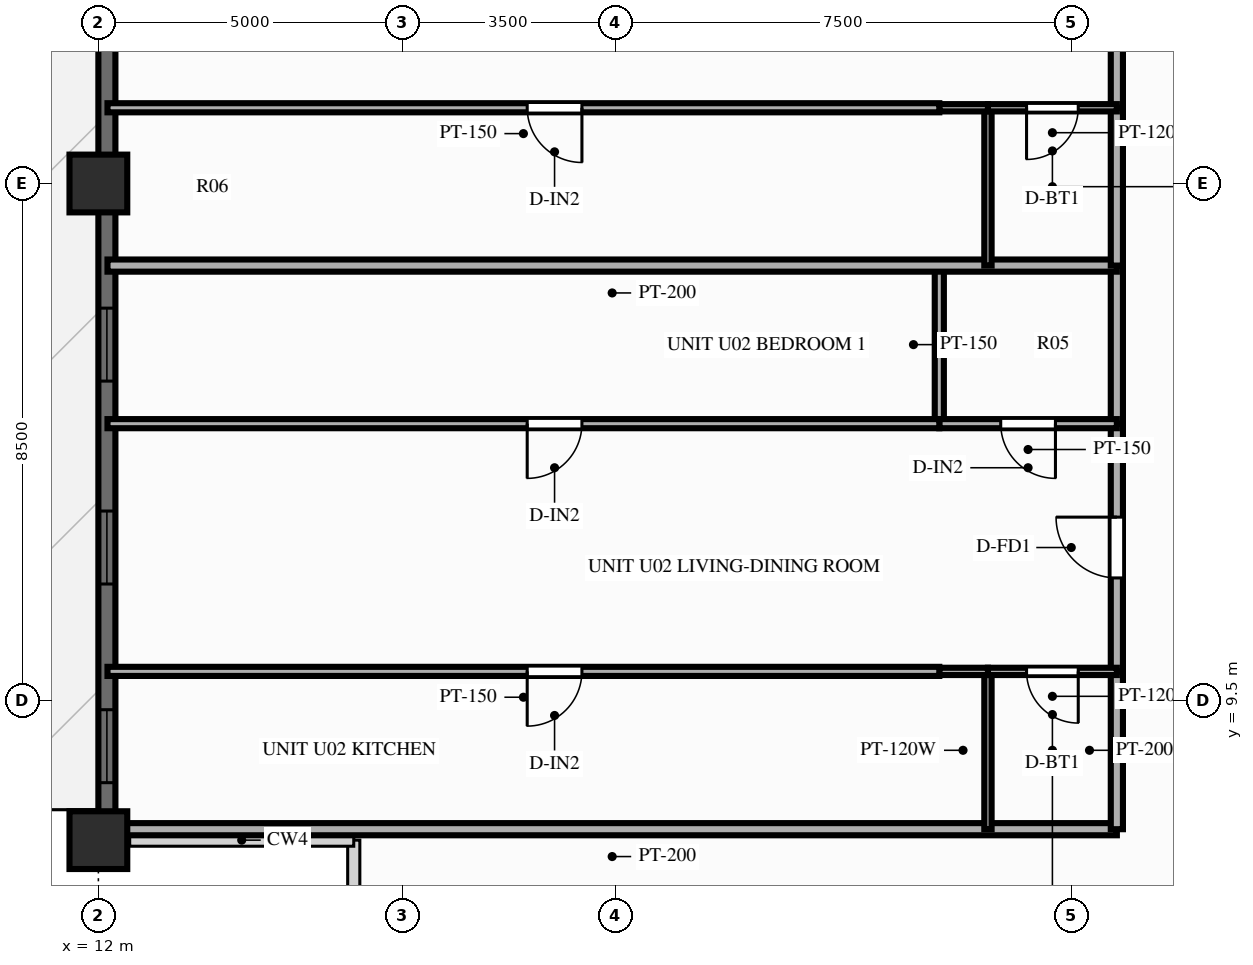
"""IFC4 building model, lengths in metres.
Left out: names, types, materials, properties, quantities, classifications, styles, units other than length and angle.
Written with IfcOpenShell. Run it as: python <this file> out.ifc"""

import sys

from ifc_helpers import new_model, si_unit, direction, frame, frame_2d, origin, origin_2d, place, context, subcontext, project, spatial, rectangle, extrude, source, transform, mapped, element, fill, save


model = new_model("IFC4")
c1 = context("Model", 3, precision=1e-05, world=origin(), true_north=direction((0.0, 1.0)))
c2 = subcontext(c1, "Body", "Model", "MODEL_VIEW")
j1 = project(units=[si_unit("LENGTHUNIT", "METRE"), si_unit("PLANEANGLEUNIT", "RADIAN")], contexts=[c1])
p1 = place(None, origin())
s1 = spatial("IfcSite", under=j1, at=p1, CompositionType="ELEMENT")
p2 = place(p1, origin())
s2 = spatial("IfcBuilding", under=s1, at=p2, CompositionType="ELEMENT")
p3 = place(p2, frame((0.0, 0.0, 135.75)))
s3 = spatial("IfcBuildingStorey", under=s2, at=p3, CompositionType="ELEMENT", Elevation=135.75)
m1 = source(origin(), c2, "Body", "SweptSolid", [
    extrude(rectangle(XDim=0.95, YDim=0.95, at=origin_2d()), origin(), (0.0, 0.0, 1.0), 3.0),
])
for number, where, z_axis, x_axis in (
    (1, (12.0, 18.0, 0.0), (0.0, 0.0, 1.0), (1.0, 0.0, 0.0)),
    (2, (12.0, 7.2, 0.0), (0.0, 0.0, 1.0), (1.0, 0.0, 0.0)),
):
    element("IfcColumn", number, at=place(p3, frame(where, z_axis=z_axis, x_axis=x_axis)), inside=s3, PredefinedType="COLUMN", context=c2, shape_type="MappedRepresentation", body=[
        mapped(m1, transform((0.0, 0.0, 0.0), scale=1.0)),
    ])
p4 = place(p3, frame((12.14, 7.2, 0.0), z_axis=(0.0, 0.0, 1.0), x_axis=(0.0, 1.0, 0.0)))
e3 = element("IfcWall", 3, at=p4, inside=s3, PredefinedType="SOLIDWALL", context=c2, shape_type="SweptSolid", body=[
    extrude(rectangle(XDim=39.6, YDim=0.28, at=frame_2d((19.8, 0.0))), origin(), (0.0, 0.0, 1.0), 2.28),
])
p5 = place(p4, frame((0.945, 0.0, 0.25)))
e4 = element("IfcOpeningElement", 4, at=p5, cuts=e3, PredefinedType="OPENING", context=c2, shape_type="SweptSolid", body=[
    extrude(rectangle(XDim=1.2, YDim=1.5, at=frame_2d((0.6, 0.75))), frame((0.0, 0.152, 0.0), z_axis=(0.0, -1.0, 0.0), x_axis=(1.0, 0.0, 0.0)), (0.0, 0.0, 1.0), 0.304),
])
p6 = place(p4, frame((4.213, 0.0, 0.25)))
e5 = element("IfcOpeningElement", 5, at=p6, cuts=e3, PredefinedType="OPENING", context=c2, shape_type="SweptSolid", body=[
    extrude(rectangle(XDim=1.2, YDim=1.5, at=frame_2d((0.6, 0.75))), frame((0.0, 0.152, 0.0), z_axis=(0.0, -1.0, 0.0), x_axis=(1.0, 0.0, 0.0)), (0.0, 0.0, 1.0), 0.304),
])
p7 = place(p4, frame((7.55, 0.0, 0.25)))
e6 = element("IfcOpeningElement", 6, at=p7, cuts=e3, PredefinedType="OPENING", context=c2, shape_type="SweptSolid", body=[
    extrude(rectangle(XDim=1.2, YDim=1.5, at=frame_2d((0.6, 0.75))), frame((0.0, 0.152, 0.0), z_axis=(0.0, -1.0, 0.0), x_axis=(1.0, 0.0, 0.0)), (0.0, 0.0, 1.0), 0.304),
])
p8 = place(p4, frame((13.483, 0.0, 0.25)))
e7 = element("IfcOpeningElement", 7, at=p8, cuts=e3, PredefinedType="OPENING", context=c2, shape_type="SweptSolid", body=[
    extrude(rectangle(XDim=1.2, YDim=1.5, at=frame_2d((0.6, 0.75))), frame((0.0, 0.152, 0.0), z_axis=(0.0, -1.0, 0.0), x_axis=(1.0, 0.0, 0.0)), (0.0, 0.0, 1.0), 0.304),
])
p9 = place(p4, frame((16.82, 0.0, 0.25)))
e8 = element("IfcOpeningElement", 8, at=p9, cuts=e3, PredefinedType="OPENING", context=c2, shape_type="SweptSolid", body=[
    extrude(rectangle(XDim=1.2, YDim=1.5, at=frame_2d((0.6, 0.75))), frame((0.0, 0.152, 0.0), z_axis=(0.0, -1.0, 0.0), x_axis=(1.0, 0.0, 0.0)), (0.0, 0.0, 1.0), 0.304),
])
p10 = place(p4, frame((19.2, 0.0, 0.25)))
e9 = element("IfcOpeningElement", 9, at=p10, cuts=e3, PredefinedType="OPENING", context=c2, shape_type="SweptSolid", body=[
    extrude(rectangle(XDim=1.2, YDim=1.5, at=frame_2d((0.6, 0.75))), frame((0.0, 0.152, 0.0), z_axis=(0.0, -1.0, 0.0), x_axis=(1.0, 0.0, 0.0)), (0.0, 0.0, 1.0), 0.304),
])
p11 = place(p4, frame((21.578, 0.0, 0.25)))
e10 = element("IfcOpeningElement", 10, at=p11, cuts=e3, PredefinedType="OPENING", context=c2, shape_type="SweptSolid", body=[
    extrude(rectangle(XDim=1.2, YDim=1.5, at=frame_2d((0.6, 0.75))), frame((0.0, 0.152, 0.0), z_axis=(0.0, -1.0, 0.0), x_axis=(1.0, 0.0, 0.0)), (0.0, 0.0, 1.0), 0.304),
])
p12 = place(p4, frame((24.713, 0.0, 0.0)))
e11 = element("IfcOpeningElement", 11, at=p12, cuts=e3, PredefinedType="OPENING", context=c2, shape_type="SweptSolid", body=[
    extrude(rectangle(XDim=1.6, YDim=2.15, at=frame_2d((0.8, 1.075))), frame((0.0, 0.152, 0.0), z_axis=(0.0, -1.0, 0.0), x_axis=(1.0, 0.0, 0.0)), (0.0, 0.0, 1.0), 0.304),
])
p13 = place(p4, frame((29.305, 0.0, 0.25)))
e12 = element("IfcOpeningElement", 12, at=p13, cuts=e3, PredefinedType="OPENING", context=c2, shape_type="SweptSolid", body=[
    extrude(rectangle(XDim=0.7, YDim=1.5, at=frame_2d((0.35, 0.75))), frame((0.0, 0.152, 0.0), z_axis=(0.0, -1.0, 0.0), x_axis=(1.0, 0.0, 0.0)), (0.0, 0.0, 1.0), 0.304),
])
p14 = place(p4, frame((30.848, 0.0, 0.25)))
e13 = element("IfcOpeningElement", 13, at=p14, cuts=e3, PredefinedType="OPENING", context=c2, shape_type="SweptSolid", body=[
    extrude(rectangle(XDim=1.2, YDim=1.5, at=frame_2d((0.6, 0.75))), frame((0.0, 0.152, 0.0), z_axis=(0.0, -1.0, 0.0), x_axis=(1.0, 0.0, 0.0)), (0.0, 0.0, 1.0), 0.304),
])
p15 = place(p4, frame((34.183, 0.0, 0.25)))
e14 = element("IfcOpeningElement", 14, at=p15, cuts=e3, PredefinedType="OPENING", context=c2, shape_type="SweptSolid", body=[
    extrude(rectangle(XDim=1.2, YDim=1.5, at=frame_2d((0.6, 0.75))), frame((0.0, 0.152, 0.0), z_axis=(0.0, -1.0, 0.0), x_axis=(1.0, 0.0, 0.0)), (0.0, 0.0, 1.0), 0.304),
])
p16 = place(p4, frame((37.452, 0.0, 0.25)))
e15 = element("IfcOpeningElement", 15, at=p16, cuts=e3, PredefinedType="OPENING", context=c2, shape_type="SweptSolid", body=[
    extrude(rectangle(XDim=1.2, YDim=1.5, at=frame_2d((0.6, 0.75))), frame((0.0, 0.152, 0.0), z_axis=(0.0, -1.0, 0.0), x_axis=(1.0, 0.0, 0.0)), (0.0, 0.0, 1.0), 0.304),
])
p17 = place(p3, frame((28.75, 7.38, 0.0), z_axis=(0.0, 0.0, 1.0), x_axis=(-1.0, 0.0, 0.0)))
e16 = element("IfcWall", 16, at=p17, inside=s3, PredefinedType="PARTITIONING", context=c2, shape_type="SweptSolid", body=[
    extrude(rectangle(XDim=16.6, YDim=0.2, at=frame_2d((8.3, 0.0))), origin(), (0.0, 0.0, 1.0), 2.79),
])
p18 = place(p3, frame((28.75, 7.38, 0.0), z_axis=(0.0, 0.0, 1.0), x_axis=(0.0, 1.0, 0.0)))
e17 = element("IfcWall", 17, at=p18, inside=s3, PredefinedType="PARTITIONING", context=c2, shape_type="SweptSolid", body=[
    extrude(rectangle(XDim=2.596, YDim=0.2, at=frame_2d((1.298, 0.0))), origin(), (0.0, 0.0, 1.0), 2.79),
])
p19 = place(p3, frame((28.75, 9.976, 0.0), z_axis=(0.0, 0.0, 1.0), x_axis=(0.0, 1.0, 0.0)))
e18 = element("IfcWall", 18, at=p19, inside=s3, PredefinedType="PARTITIONING", context=c2, shape_type="SweptSolid", body=[
    extrude(rectangle(XDim=4.074, YDim=0.2, at=frame_2d((2.037, 0.0))), origin(), (0.0, 0.0, 1.0), 2.79),
])
p20 = place(p19, frame((1.537, 0.0, 0.0)))
e19 = element("IfcOpeningElement", 19, at=p20, cuts=e18, PredefinedType="OPENING", context=c2, shape_type="SweptSolid", body=[
    extrude(rectangle(XDim=1.0, YDim=2.15, at=frame_2d((0.5, 1.075))), frame((0.0, 0.112, 0.0), z_axis=(0.0, -1.0, 0.0), x_axis=(1.0, 0.0, 0.0)), (0.0, 0.0, 1.0), 0.224),
])
p21 = place(p3, frame((28.75, 14.05, 0.0), z_axis=(0.0, 0.0, 1.0), x_axis=(0.0, 1.0, 0.0)))
e20 = element("IfcWall", 20, at=p21, inside=s3, PredefinedType="PARTITIONING", context=c2, shape_type="SweptSolid", body=[
    extrude(rectangle(XDim=2.6, YDim=0.2, at=frame_2d((1.3, 0.0))), origin(), (0.0, 0.0, 1.0), 2.79),
])
p22 = place(p3, frame((26.63, 7.38, 0.0), z_axis=(0.0, 0.0, 1.0), x_axis=(0.0, 1.0, 0.0)))
e21 = element("IfcWall", 21, at=p22, inside=s3, PredefinedType="PARTITIONING", context=c2, shape_type="SweptSolid", body=[
    extrude(rectangle(XDim=2.596, YDim=0.12, at=frame_2d((1.298, 0.0))), origin(), (0.0, 0.0, 1.0), 2.79),
])
p23 = place(p3, frame((25.83, 14.05, 0.0), z_axis=(0.0, 0.0, 1.0), x_axis=(0.0, 1.0, 0.0)))
e22 = element("IfcWall", 22, at=p23, inside=s3, PredefinedType="PARTITIONING", context=c2, shape_type="SweptSolid", body=[
    extrude(rectangle(XDim=2.6, YDim=0.15, at=frame_2d((1.3, 0.0))), origin(), (0.0, 0.0, 1.0), 2.79),
])
p24 = place(p3, frame((28.75, 9.976, 0.0), z_axis=(0.0, 0.0, 1.0), x_axis=(-1.0, 0.0, 0.0)))
e23 = element("IfcWall", 23, at=p24, inside=s3, PredefinedType="PARTITIONING", context=c2, shape_type="SweptSolid", body=[
    extrude(rectangle(XDim=2.12, YDim=0.12, at=frame_2d((1.06, 0.0))), origin(), (0.0, 0.0, 1.0), 2.79),
])
p25 = place(p24, frame((0.635, 0.0, 0.0)))
e24 = element("IfcOpeningElement", 24, at=p25, cuts=e23, PredefinedType="OPENING", context=c2, shape_type="SweptSolid", body=[
    extrude(rectangle(XDim=0.85, YDim=2.05, at=frame_2d((0.425, 1.025))), frame((0.0, 0.072, 0.0), z_axis=(0.0, -1.0, 0.0), x_axis=(1.0, 0.0, 0.0)), (0.0, 0.0, 1.0), 0.144),
])
p26 = place(p3, frame((26.63, 9.976, 0.0), z_axis=(0.0, 0.0, 1.0), x_axis=(-1.0, 0.0, 0.0)))
e25 = element("IfcWall", 25, at=p26, inside=s3, PredefinedType="PARTITIONING", context=c2, shape_type="SweptSolid", body=[
    extrude(rectangle(XDim=0.8, YDim=0.12, at=frame_2d((0.4, 0.0))), origin(), (0.0, 0.0, 1.0), 2.79),
])
p27 = place(p3, frame((25.83, 9.976, 0.0), z_axis=(0.0, 0.0, 1.0), x_axis=(-1.0, 0.0, 0.0)))
e26 = element("IfcWall", 26, at=p27, inside=s3, PredefinedType="PARTITIONING", context=c2, shape_type="SweptSolid", body=[
    extrude(rectangle(XDim=13.68, YDim=0.15, at=frame_2d((6.84, 0.0))), origin(), (0.0, 0.0, 1.0), 2.79),
])
p28 = place(p27, frame((5.877, 0.0, 0.0)))
e27 = element("IfcOpeningElement", 27, at=p28, cuts=e26, PredefinedType="OPENING", context=c2, shape_type="SweptSolid", body=[
    extrude(rectangle(XDim=0.9, YDim=2.1, at=frame_2d((0.45, 1.05))), frame((0.0, 0.087, 0.0), z_axis=(0.0, -1.0, 0.0), x_axis=(1.0, 0.0, 0.0)), (0.0, 0.0, 1.0), 0.174),
])
p29 = place(p3, frame((28.75, 14.05, 0.0), z_axis=(0.0, 0.0, 1.0), x_axis=(-1.0, 0.0, 0.0)))
e28 = element("IfcWall", 28, at=p29, inside=s3, PredefinedType="PARTITIONING", context=c2, shape_type="SweptSolid", body=[
    extrude(rectangle(XDim=2.92, YDim=0.15, at=frame_2d((1.46, 0.0))), origin(), (0.0, 0.0, 1.0), 2.79),
])
p30 = place(p29, frame((1.01, 0.0, 0.0)))
e29 = element("IfcOpeningElement", 29, at=p30, cuts=e28, PredefinedType="OPENING", context=c2, shape_type="SweptSolid", body=[
    extrude(rectangle(XDim=0.9, YDim=2.1, at=frame_2d((0.45, 1.05))), frame((0.0, 0.087, 0.0), z_axis=(0.0, -1.0, 0.0), x_axis=(1.0, 0.0, 0.0)), (0.0, 0.0, 1.0), 0.174),
])
p31 = place(p3, frame((25.83, 14.05, 0.0), z_axis=(0.0, 0.0, 1.0), x_axis=(-1.0, 0.0, 0.0)))
e30 = element("IfcWall", 30, at=p31, inside=s3, PredefinedType="PARTITIONING", context=c2, shape_type="SweptSolid", body=[
    extrude(rectangle(XDim=13.68, YDim=0.15, at=frame_2d((6.84, 0.0))), origin(), (0.0, 0.0, 1.0), 2.79),
])
p32 = place(p31, frame((5.877, 0.0, 0.0)))
e31 = element("IfcOpeningElement", 31, at=p32, cuts=e30, PredefinedType="OPENING", context=c2, shape_type="SweptSolid", body=[
    extrude(rectangle(XDim=0.9, YDim=2.1, at=frame_2d((0.45, 1.05))), frame((0.0, 0.087, 0.0), z_axis=(0.0, -1.0, 0.0), x_axis=(1.0, 0.0, 0.0)), (0.0, 0.0, 1.0), 0.174),
])
p33 = place(p3, frame((28.75, 16.65, 0.0), z_axis=(0.0, 0.0, 1.0), x_axis=(-1.0, 0.0, 0.0)))
e32 = element("IfcWall", 32, at=p33, inside=s3, PredefinedType="PARTITIONING", context=c2, shape_type="SweptSolid", body=[
    extrude(rectangle(XDim=16.6, YDim=0.2, at=frame_2d((8.3, 0.0))), origin(), (0.0, 0.0, 1.0), 2.79),
])
p34 = place(p3, frame((28.75, 16.65, 0.0), z_axis=(0.0, 0.0, 1.0), x_axis=(0.0, 1.0, 0.0)))
e33 = element("IfcWall", 33, at=p34, inside=s3, PredefinedType="PARTITIONING", context=c2, shape_type="SweptSolid", body=[
    extrude(rectangle(XDim=2.596, YDim=0.2, at=frame_2d((1.298, 0.0))), origin(), (0.0, 0.0, 1.0), 2.79),
])
p35 = place(p3, frame((28.75, 19.246, 0.0), z_axis=(0.0, 0.0, 1.0), x_axis=(0.0, 1.0, 0.0)))
e34 = element("IfcWall", 34, at=p35, inside=s3, PredefinedType="PARTITIONING", context=c2, shape_type="SweptSolid", body=[
    extrude(rectangle(XDim=4.074, YDim=0.2, at=frame_2d((2.037, 0.0))), origin(), (0.0, 0.0, 1.0), 2.79),
])
p36 = place(p35, frame((1.537, 0.0, 0.0)))
e35 = element("IfcOpeningElement", 35, at=p36, cuts=e34, PredefinedType="OPENING", context=c2, shape_type="SweptSolid", body=[
    extrude(rectangle(XDim=1.0, YDim=2.15, at=frame_2d((0.5, 1.075))), frame((0.0, 0.112, 0.0), z_axis=(0.0, -1.0, 0.0), x_axis=(1.0, 0.0, 0.0)), (0.0, 0.0, 1.0), 0.224),
])
p37 = place(p3, frame((26.63, 16.65, 0.0), z_axis=(0.0, 0.0, 1.0), x_axis=(0.0, 1.0, 0.0)))
e36 = element("IfcWall", 36, at=p37, inside=s3, PredefinedType="PARTITIONING", context=c2, shape_type="SweptSolid", body=[
    extrude(rectangle(XDim=2.596, YDim=0.12, at=frame_2d((1.298, 0.0))), origin(), (0.0, 0.0, 1.0), 2.79),
])
p38 = place(p3, frame((28.75, 19.246, 0.0), z_axis=(0.0, 0.0, 1.0), x_axis=(-1.0, 0.0, 0.0)))
e37 = element("IfcWall", 37, at=p38, inside=s3, PredefinedType="PARTITIONING", context=c2, shape_type="SweptSolid", body=[
    extrude(rectangle(XDim=2.12, YDim=0.12, at=frame_2d((1.06, 0.0))), origin(), (0.0, 0.0, 1.0), 2.79),
])
p39 = place(p38, frame((0.635, 0.0, 0.0)))
e38 = element("IfcOpeningElement", 38, at=p39, cuts=e37, PredefinedType="OPENING", context=c2, shape_type="SweptSolid", body=[
    extrude(rectangle(XDim=0.85, YDim=2.05, at=frame_2d((0.425, 1.025))), frame((0.0, 0.072, 0.0), z_axis=(0.0, -1.0, 0.0), x_axis=(1.0, 0.0, 0.0)), (0.0, 0.0, 1.0), 0.144),
])
p40 = place(p3, frame((26.63, 19.246, 0.0), z_axis=(0.0, 0.0, 1.0), x_axis=(-1.0, 0.0, 0.0)))
e39 = element("IfcWall", 39, at=p40, inside=s3, PredefinedType="PARTITIONING", context=c2, shape_type="SweptSolid", body=[
    extrude(rectangle(XDim=0.8, YDim=0.12, at=frame_2d((0.4, 0.0))), origin(), (0.0, 0.0, 1.0), 2.79),
])
p41 = place(p3, frame((25.83, 19.246, 0.0), z_axis=(0.0, 0.0, 1.0), x_axis=(-1.0, 0.0, 0.0)))
e40 = element("IfcWall", 40, at=p41, inside=s3, PredefinedType="PARTITIONING", context=c2, shape_type="SweptSolid", body=[
    extrude(rectangle(XDim=13.68, YDim=0.15, at=frame_2d((6.84, 0.0))), origin(), (0.0, 0.0, 1.0), 2.79),
])
p42 = place(p41, frame((5.877, 0.0, 0.0)))
e41 = element("IfcOpeningElement", 41, at=p42, cuts=e40, PredefinedType="OPENING", context=c2, shape_type="SweptSolid", body=[
    extrude(rectangle(XDim=0.9, YDim=2.1, at=frame_2d((0.45, 1.05))), frame((0.0, 0.087, 0.0), z_axis=(0.0, -1.0, 0.0), x_axis=(1.0, 0.0, 0.0)), (0.0, 0.0, 1.0), 0.174),
])
m2 = source(origin(), c2, "Body", "SweptSolid", [
    extrude(rectangle(XDim=1.2, YDim=1.5, at=frame_2d((0.6, 0.75))), frame((0.0, 0.03, 0.0), z_axis=(0.0, -1.0, 0.0), x_axis=(1.0, 0.0, 0.0)), (0.0, 0.0, 1.0), 0.06),
])
p43 = place(p5, origin())
e42 = element("IfcWindow", 42, at=p43, inside=s3, PartitioningType="SINGLE_PANEL", PredefinedType="WINDOW", context=c2, shape_type="MappedRepresentation", body=[
    mapped(m2, transform((0.0, 0.0, 0.0), scale=1.0)),
])
fill(e4, e42)
p44 = place(p6, origin())
e43 = element("IfcWindow", 43, at=p44, inside=s3, PartitioningType="SINGLE_PANEL", PredefinedType="WINDOW", context=c2, shape_type="MappedRepresentation", body=[
    mapped(m2, transform((0.0, 0.0, 0.0), scale=1.0)),
])
fill(e5, e43)
p45 = place(p7, origin())
e44 = element("IfcWindow", 44, at=p45, inside=s3, PartitioningType="SINGLE_PANEL", PredefinedType="WINDOW", context=c2, shape_type="MappedRepresentation", body=[
    mapped(m2, transform((0.0, 0.0, 0.0), scale=1.0)),
])
fill(e6, e44)
m3 = source(origin(), c2, "Body", "SweptSolid", [
    extrude(rectangle(XDim=1.0, YDim=2.15, at=frame_2d((0.5, 1.075))), frame((0.0, 0.025, 0.0), z_axis=(0.0, -1.0, 0.0), x_axis=(1.0, 0.0, 0.0)), (0.0, 0.0, 1.0), 0.05),
])
p46 = place(p20, origin())
e45 = element("IfcDoor", 45, at=p46, inside=s3, OperationType="SINGLE_SWING_RIGHT", PredefinedType="DOOR", context=c2, shape_type="MappedRepresentation", body=[
    mapped(m3, transform((0.0, 0.0, 0.0), scale=1.0)),
])
fill(e19, e45)
m4 = source(origin(), c2, "Body", "SweptSolid", [
    extrude(rectangle(XDim=0.85, YDim=2.05, at=frame_2d((0.425, 1.025))), frame((0.0, 0.025, 0.0), z_axis=(0.0, -1.0, 0.0), x_axis=(1.0, 0.0, 0.0)), (0.0, 0.0, 1.0), 0.05),
])
p47 = place(p25, origin())
e46 = element("IfcDoor", 46, at=p47, inside=s3, OperationType="SINGLE_SWING_LEFT", PredefinedType="DOOR", context=c2, shape_type="MappedRepresentation", body=[
    mapped(m4, transform((0.0, 0.0, 0.0), scale=1.0)),
])
fill(e24, e46)
m5 = source(origin(), c2, "Body", "SweptSolid", [
    extrude(rectangle(XDim=0.9, YDim=2.1, at=frame_2d((0.45, 1.05))), frame((0.0, 0.025, 0.0), z_axis=(0.0, -1.0, 0.0), x_axis=(1.0, 0.0, 0.0)), (0.0, 0.0, 1.0), 0.05),
])
p48 = place(p28, origin())
e47 = element("IfcDoor", 47, at=p48, inside=s3, OperationType="SINGLE_SWING_RIGHT", PredefinedType="DOOR", context=c2, shape_type="MappedRepresentation", body=[
    mapped(m5, transform((0.0, 0.0, 0.0), scale=1.0)),
])
fill(e27, e47)
p49 = place(p30, origin())
e48 = element("IfcDoor", 48, at=p49, inside=s3, OperationType="SINGLE_SWING_LEFT", PredefinedType="DOOR", context=c2, shape_type="MappedRepresentation", body=[
    mapped(m5, transform((0.0, 0.0, 0.0), scale=1.0)),
])
fill(e29, e48)
p50 = place(p32, origin())
e49 = element("IfcDoor", 49, at=p50, inside=s3, OperationType="SINGLE_SWING_RIGHT", PredefinedType="DOOR", context=c2, shape_type="MappedRepresentation", body=[
    mapped(m5, transform((0.0, 0.0, 0.0), scale=1.0)),
])
fill(e31, e49)
p51 = place(p39, origin())
e50 = element("IfcDoor", 50, at=p51, inside=s3, OperationType="SINGLE_SWING_RIGHT", PredefinedType="DOOR", context=c2, shape_type="MappedRepresentation", body=[
    mapped(m4, transform((0.0, 0.0, 0.0), scale=1.0)),
])
fill(e38, e50)
p52 = place(p42, origin())
e51 = element("IfcDoor", 51, at=p52, inside=s3, OperationType="SINGLE_SWING_LEFT", PredefinedType="DOOR", context=c2, shape_type="MappedRepresentation", body=[
    mapped(m5, transform((0.0, 0.0, 0.0), scale=1.0)),
])
fill(e41, e51)
save(model, sys.argv[1])
